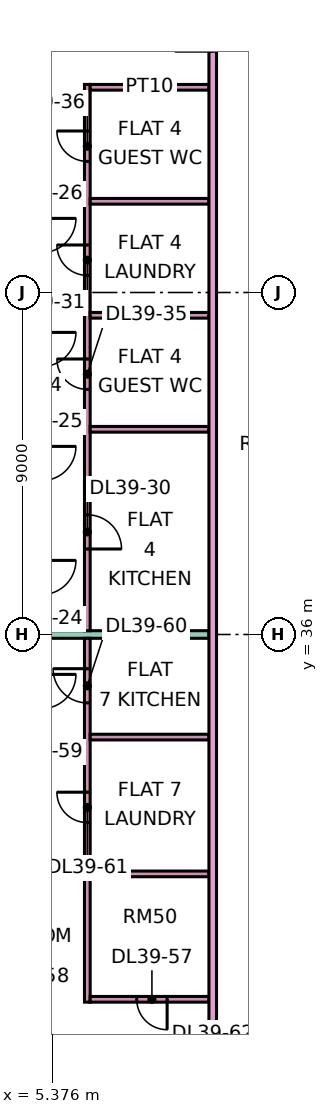
"""IFC4 building model, lengths in metres.
Left out: names, types, materials, properties, quantities, classifications, styles, units other than length and angle.
Written with IfcOpenShell. Run it as: python <this file> out.ifc"""

import sys

from ifc_helpers import new_model, si_unit, direction, frame, frame_2d, origin, place, context, subcontext, project, spatial, rectangle, extrude, element, fill, save


model = new_model("IFC4")
c1 = context("Model", 3, precision=1e-05, world=origin(), true_north=direction((0.0, 1.0)))
c2 = subcontext(c1, "Body", "Model", "MODEL_VIEW")
j1 = project(units=[si_unit("LENGTHUNIT", "METRE"), si_unit("PLANEANGLEUNIT", "RADIAN")], contexts=[c1])
p1 = place(None, origin())
s1 = spatial("IfcSite", under=j1, at=p1, CompositionType="ELEMENT")
p2 = place(p1, origin())
s2 = spatial("IfcBuilding", under=s1, at=p2, CompositionType="ELEMENT")
p3 = place(p2, frame((0.0, 0.0, 172.4)))
s3 = spatial("IfcBuildingStorey", under=s2, at=p3, CompositionType="ELEMENT", Elevation=172.4)
p4 = place(p3, frame((0.0, 36.0, 0.0), z_axis=(0.0, 0.0, 1.0), x_axis=(1.0, 0.0, 0.0)))
e1 = element("IfcWall", 1, at=p4, inside=s3, PredefinedType="PARTITIONING", context=c2, shape_type="SweptSolid", body=[
    extrude(rectangle(XDim=9.5, YDim=0.2, at=frame_2d((4.75, 0.0))), origin(), (0.0, 0.0, 1.0), 3.35),
])
p5 = place(p3, frame((6.3, 26.325, 0.0), z_axis=(0.0, 0.0, 1.0), x_axis=(0.0, 1.0, 0.0)))
e2 = element("IfcWall", 2, at=p5, inside=s3, PredefinedType="PARTITIONING", context=c2, shape_type="SweptSolid", body=[
    extrude(rectangle(XDim=9.575, YDim=0.15, at=frame_2d((4.788, 0.0))), origin(), (0.0, 0.0, 1.0), 3.35),
])
p6 = place(p5, frame((7.875, 0.0, 0.0)))
e3 = element("IfcOpeningElement", 3, at=p6, cuts=e2, PredefinedType="OPENING", context=c2, shape_type="SweptSolid", body=[
    extrude(rectangle(XDim=0.9, YDim=2.1, at=frame_2d((0.45, 1.05))), frame((0.0, 0.085, 0.0), z_axis=(0.0, -1.0, 0.0), x_axis=(1.0, 0.0, 0.0)), (0.0, 0.0, 1.0), 0.17),
])
p7 = place(p5, frame((4.725, 0.0, 0.0)))
e4 = element("IfcOpeningElement", 4, at=p7, cuts=e2, PredefinedType="OPENING", context=c2, shape_type="SweptSolid", body=[
    extrude(rectangle(XDim=0.8, YDim=2.1, at=frame_2d((0.4, 1.05))), frame((0.0, 0.085, 0.0), z_axis=(0.0, -1.0, 0.0), x_axis=(1.0, 0.0, 0.0)), (0.0, 0.0, 1.0), 0.17),
])
p8 = place(p3, frame((6.3, 36.1, 0.0), z_axis=(0.0, 0.0, 1.0), x_axis=(0.0, 1.0, 0.0)))
e5 = element("IfcWall", 5, at=p8, inside=s3, PredefinedType="PARTITIONING", context=c2, shape_type="SweptSolid", body=[
    extrude(rectangle(XDim=14.375, YDim=0.15, at=frame_2d((7.188, 0.0))), origin(), (0.0, 0.0, 1.0), 3.35),
])
p9 = place(p8, frame((2.15, 0.0, 0.0)))
e6 = element("IfcOpeningElement", 6, at=p9, cuts=e5, PredefinedType="OPENING", context=c2, shape_type="SweptSolid", body=[
    extrude(rectangle(XDim=0.9, YDim=2.1, at=frame_2d((0.45, 1.05))), frame((0.0, 0.085, 0.0), z_axis=(0.0, -1.0, 0.0), x_axis=(1.0, 0.0, 0.0)), (0.0, 0.0, 1.0), 0.17),
])
p10 = place(p8, frame((9.35, 0.0, 0.0)))
e7 = element("IfcOpeningElement", 7, at=p10, cuts=e5, PredefinedType="OPENING", context=c2, shape_type="SweptSolid", body=[
    extrude(rectangle(XDim=0.8, YDim=2.1, at=frame_2d((0.4, 1.05))), frame((0.0, 0.085, 0.0), z_axis=(0.0, -1.0, 0.0), x_axis=(1.0, 0.0, 0.0)), (0.0, 0.0, 1.0), 0.17),
])
p11 = place(p8, frame((6.35, 0.0, 0.0)))
e8 = element("IfcOpeningElement", 8, at=p11, cuts=e5, PredefinedType="OPENING", context=c2, shape_type="SweptSolid", body=[
    extrude(rectangle(XDim=0.8, YDim=2.1, at=frame_2d((0.4, 1.05))), frame((0.0, 0.085, 0.0), z_axis=(0.0, -1.0, 0.0), x_axis=(1.0, 0.0, 0.0)), (0.0, 0.0, 1.0), 0.17),
])
p12 = place(p8, frame((12.35, 0.0, 0.0)))
e9 = element("IfcOpeningElement", 9, at=p12, cuts=e5, PredefinedType="OPENING", context=c2, shape_type="SweptSolid", body=[
    extrude(rectangle(XDim=0.8, YDim=2.1, at=frame_2d((0.4, 1.05))), frame((0.0, 0.085, 0.0), z_axis=(0.0, -1.0, 0.0), x_axis=(1.0, 0.0, 0.0)), (0.0, 0.0, 1.0), 0.17),
])
p13 = place(p3, frame((6.375, 26.4, 0.0), z_axis=(0.0, 0.0, 1.0), x_axis=(1.0, 0.0, 0.0)))
e10 = element("IfcWall", 10, at=p13, inside=s3, PredefinedType="PARTITIONING", context=c2, shape_type="SweptSolid", body=[
    extrude(rectangle(XDim=3.125, YDim=0.15, at=frame_2d((1.562, 0.0))), origin(), (0.0, 0.0, 1.0), 3.35),
])
p14 = place(p13, frame((1.225, 0.0, 0.0)))
e11 = element("IfcOpeningElement", 11, at=p14, cuts=e10, PredefinedType="OPENING", context=c2, shape_type="SweptSolid", body=[
    extrude(rectangle(XDim=0.8, YDim=2.1, at=frame_2d((0.4, 1.05))), frame((0.0, 0.085, 0.0), z_axis=(0.0, -1.0, 0.0), x_axis=(1.0, 0.0, 0.0)), (0.0, 0.0, 1.0), 0.17),
])
for number, where, z_axis, x_axis in (
    (12, (6.375, 29.7, 0.0), (0.0, 0.0, 1.0), (1.0, 0.0, 0.0)),
    (13, (6.375, 33.3, 0.0), (0.0, 0.0, 1.0), (1.0, 0.0, 0.0)),
    (14, (6.375, 41.4, 0.0), (0.0, 0.0, 1.0), (1.0, 0.0, 0.0)),
    (15, (6.375, 44.4, 0.0), (0.0, 0.0, 1.0), (1.0, 0.0, 0.0)),
    (16, (6.375, 47.4, 0.0), (0.0, 0.0, 1.0), (1.0, 0.0, 0.0)),
    (17, (6.375, 50.4, 0.0), (0.0, 0.0, 1.0), (1.0, 0.0, 0.0)),
):
    element("IfcWall", number, at=place(p3, frame(where, z_axis=z_axis, x_axis=x_axis)), inside=s3, PredefinedType="PARTITIONING", context=c2, shape_type="SweptSolid", body=[
        extrude(rectangle(XDim=3.125, YDim=0.15, at=frame_2d((1.562, 0.0))), origin(), (0.0, 0.0, 1.0), 3.35),
    ])
p15 = place(p3, frame((9.6, 20.0, 0.0), z_axis=(0.0, 0.0, 1.0), x_axis=(0.0, 1.0, 0.0)))
e18 = element("IfcWall", 18, at=p15, inside=s3, PredefinedType="PARTITIONING", context=c2, shape_type="SweptSolid", body=[
    extrude(rectangle(XDim=42.926, YDim=0.2, at=frame_2d((21.463, 0.0))), origin(), (0.0, 0.0, 1.0), 3.35),
])
p16 = place(p15, frame((31.35, 0.0, 0.0)))
e19 = element("IfcOpeningElement", 19, at=p16, cuts=e18, PredefinedType="OPENING", context=c2, shape_type="SweptSolid", body=[
    extrude(rectangle(XDim=1.0, YDim=2.1, at=frame_2d((0.5, 1.05))), frame((0.0, 0.11, 0.0), z_axis=(0.0, -1.0, 0.0), x_axis=(1.0, 0.0, 0.0)), (0.0, 0.0, 1.0), 0.22),
])
p17 = place(p15, frame((0.6, 0.0, 0.0)))
e20 = element("IfcOpeningElement", 20, at=p17, cuts=e18, PredefinedType="OPENING", context=c2, shape_type="SweptSolid", body=[
    extrude(rectangle(XDim=1.2, YDim=2.1, at=frame_2d((0.6, 1.05))), frame((0.0, 0.11, 0.0), z_axis=(0.0, -1.0, 0.0), x_axis=(1.0, 0.0, 0.0)), (0.0, 0.0, 1.0), 0.22),
])
p18 = place(p15, frame((3.9, 0.0, 0.0)))
e21 = element("IfcOpeningElement", 21, at=p18, cuts=e18, PredefinedType="OPENING", context=c2, shape_type="SweptSolid", body=[
    extrude(rectangle(XDim=1.0, YDim=2.1, at=frame_2d((0.5, 1.05))), frame((0.0, 0.11, 0.0), z_axis=(0.0, -1.0, 0.0), x_axis=(1.0, 0.0, 0.0)), (0.0, 0.0, 1.0), 0.22),
])
p19 = place(p9, frame((0.9, 0.0, 0.0), z_axis=(0.0, 0.0, 1.0), x_axis=(-1.0, 0.0, 0.0)))
e22 = element("IfcDoor", 22, at=p19, inside=s3, OperationType="SINGLE_SWING_LEFT", PredefinedType="DOOR", context=c2, shape_type="SweptSolid", body=[
    extrude(rectangle(XDim=0.9, YDim=2.1, at=frame_2d((0.45, 1.05))), frame((0.0, 0.025, 0.0), z_axis=(0.0, -1.0, 0.0), x_axis=(1.0, 0.0, 0.0)), (0.0, 0.0, 1.0), 0.05),
])
fill(e6, e22)
p20 = place(p10, frame((0.8, 0.0, 0.0), z_axis=(0.0, 0.0, 1.0), x_axis=(-1.0, 0.0, 0.0)))
e23 = element("IfcDoor", 23, at=p20, inside=s3, OperationType="SINGLE_SWING_RIGHT", PredefinedType="DOOR", context=c2, shape_type="SweptSolid", body=[
    extrude(rectangle(XDim=0.8, YDim=2.1, at=frame_2d((0.4, 1.05))), frame((0.0, 0.025, 0.0), z_axis=(0.0, -1.0, 0.0), x_axis=(1.0, 0.0, 0.0)), (0.0, 0.0, 1.0), 0.05),
])
fill(e7, e23)
p21 = place(p11, frame((0.8, 0.0, 0.0), z_axis=(0.0, 0.0, 1.0), x_axis=(-1.0, 0.0, 0.0)))
e24 = element("IfcDoor", 24, at=p21, inside=s3, OperationType="SINGLE_SWING_RIGHT", PredefinedType="DOOR", context=c2, shape_type="SweptSolid", body=[
    extrude(rectangle(XDim=0.8, YDim=2.1, at=frame_2d((0.4, 1.05))), frame((0.0, 0.025, 0.0), z_axis=(0.0, -1.0, 0.0), x_axis=(1.0, 0.0, 0.0)), (0.0, 0.0, 1.0), 0.05),
])
fill(e8, e24)
p22 = place(p12, frame((0.8, 0.0, 0.0), z_axis=(0.0, 0.0, 1.0), x_axis=(-1.0, 0.0, 0.0)))
e25 = element("IfcDoor", 25, at=p22, inside=s3, OperationType="SINGLE_SWING_RIGHT", PredefinedType="DOOR", context=c2, shape_type="SweptSolid", body=[
    extrude(rectangle(XDim=0.8, YDim=2.1, at=frame_2d((0.4, 1.05))), frame((0.0, 0.025, 0.0), z_axis=(0.0, -1.0, 0.0), x_axis=(1.0, 0.0, 0.0)), (0.0, 0.0, 1.0), 0.05),
])
fill(e9, e25)
p23 = place(p14, origin())
e26 = element("IfcDoor", 26, at=p23, inside=s3, OperationType="SINGLE_SWING_RIGHT", PredefinedType="DOOR", context=c2, shape_type="SweptSolid", body=[
    extrude(rectangle(XDim=0.8, YDim=2.1, at=frame_2d((0.4, 1.05))), frame((0.0, 0.025, 0.0), z_axis=(0.0, -1.0, 0.0), x_axis=(1.0, 0.0, 0.0)), (0.0, 0.0, 1.0), 0.05),
])
fill(e11, e26)
p24 = place(p6, frame((0.9, 0.0, 0.0), z_axis=(0.0, 0.0, 1.0), x_axis=(-1.0, 0.0, 0.0)))
e27 = element("IfcDoor", 27, at=p24, inside=s3, OperationType="SINGLE_SWING_RIGHT", PredefinedType="DOOR", context=c2, shape_type="SweptSolid", body=[
    extrude(rectangle(XDim=0.9, YDim=2.1, at=frame_2d((0.45, 1.05))), frame((0.0, 0.025, 0.0), z_axis=(0.0, -1.0, 0.0), x_axis=(1.0, 0.0, 0.0)), (0.0, 0.0, 1.0), 0.05),
])
fill(e3, e27)
p25 = place(p7, frame((0.8, 0.0, 0.0), z_axis=(0.0, 0.0, 1.0), x_axis=(-1.0, 0.0, 0.0)))
e28 = element("IfcDoor", 28, at=p25, inside=s3, OperationType="SINGLE_SWING_RIGHT", PredefinedType="DOOR", context=c2, shape_type="SweptSolid", body=[
    extrude(rectangle(XDim=0.8, YDim=2.1, at=frame_2d((0.4, 1.05))), frame((0.0, 0.025, 0.0), z_axis=(0.0, -1.0, 0.0), x_axis=(1.0, 0.0, 0.0)), (0.0, 0.0, 1.0), 0.05),
])
fill(e4, e28)
save(model, sys.argv[1])
